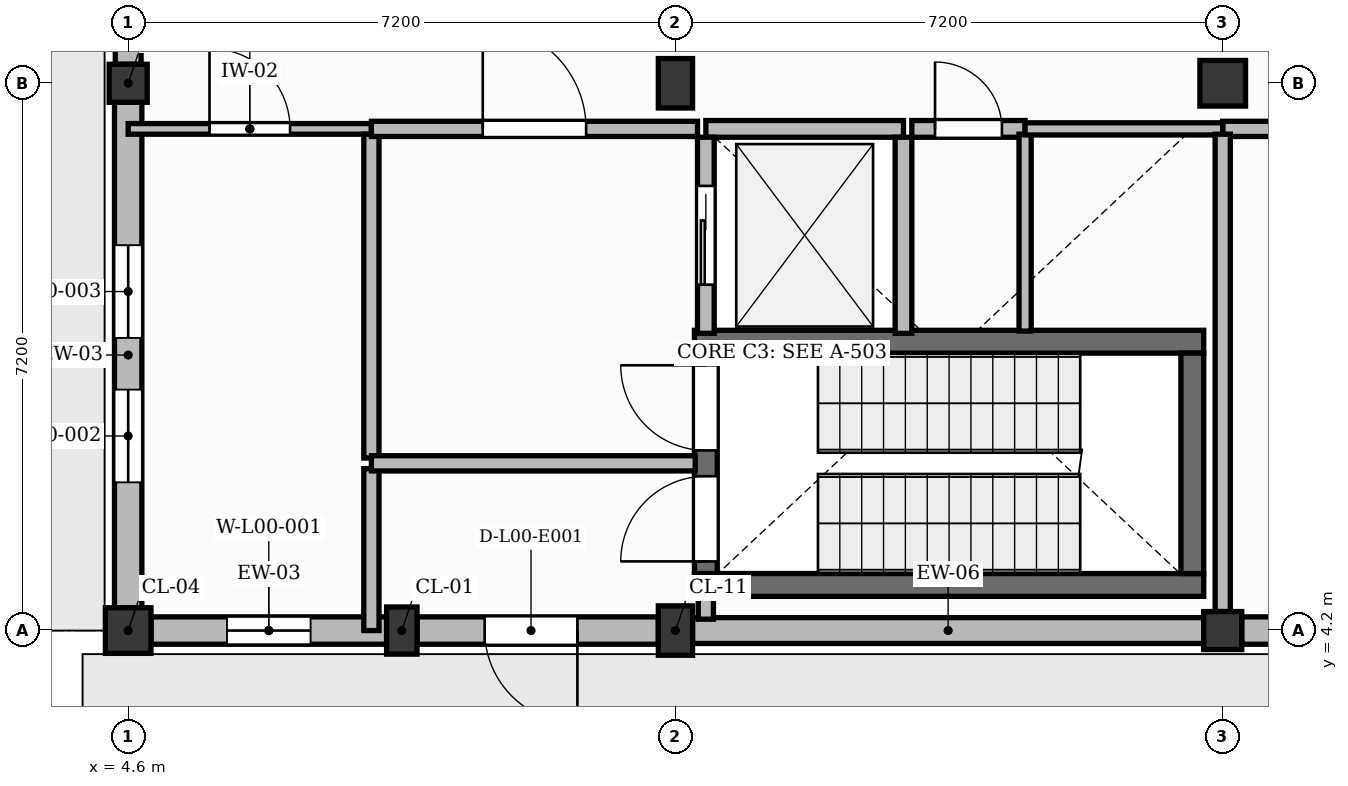
"""IFC4 building model, lengths in metres.
Left out: names, types, materials, properties, quantities, classifications, styles, units other than length and angle.
Written with IfcOpenShell. Run it as: python <this file> out.ifc"""

import sys

from ifc_helpers import new_model, si_unit, direction, frame, frame_2d, origin, origin_2d, place, context, subcontext, project, spatial, rectangle, extrude, element, fill, save


model = new_model("IFC4")
c1 = context("Model", 3, precision=1e-05, world=origin(), true_north=direction((0.0, 1.0)))
c2 = subcontext(c1, "Body", "Model", "MODEL_VIEW")
j1 = project(units=[si_unit("LENGTHUNIT", "METRE"), si_unit("PLANEANGLEUNIT", "RADIAN")], contexts=[c1])
p1 = place(None, origin())
s1 = spatial("IfcSite", under=j1, at=p1, CompositionType="ELEMENT")
p2 = place(p1, origin())
s2 = spatial("IfcBuilding", under=s1, at=p2, CompositionType="ELEMENT")
p3 = place(p2, origin())
s3 = spatial("IfcBuildingStorey", under=s2, at=p3, CompositionType="ELEMENT", Elevation=0.0)
p4 = place(p3, frame((4.6, 4.2, 0.0), z_axis=(0.0, 0.0, 1.0), x_axis=(1.0, 0.0, 0.0)))
e1 = element("IfcColumn", 1, at=p4, inside=s3, PredefinedType="COLUMN", context=c2, shape_type="SweptSolid", body=[
    extrude(rectangle(XDim=0.6, YDim=0.6, at=origin_2d()), origin(), (0.0, 0.0, 1.0), 4.2),
])
p5 = place(p3, frame((4.6, 11.4, 0.0), z_axis=(0.0, 0.0, 1.0), x_axis=(1.0, 0.0, 0.0)))
e2 = element("IfcColumn", 2, at=p5, inside=s3, PredefinedType="COLUMN", context=c2, shape_type="SweptSolid", body=[
    extrude(rectangle(XDim=0.5, YDim=0.5, at=origin_2d()), origin(), (0.0, 0.0, 1.0), 4.2),
])
for number, where, z_axis, x_axis in (
    (3, (11.8, 4.2, 0.0), (0.0, 0.0, 1.0), (1.0, 0.0, 0.0)),
    (4, (11.8, 11.4, 0.0), (0.0, 0.0, 1.0), (1.0, 0.0, 0.0)),
):
    element("IfcColumn", number, at=place(p3, frame(where, z_axis=z_axis, x_axis=x_axis)), inside=s3, PredefinedType="COLUMN", context=c2, shape_type="SweptSolid", body=[
        extrude(rectangle(XDim=0.45, YDim=0.65, at=origin_2d()), origin(), (0.0, 0.0, 1.0), 4.2),
    ])
p6 = place(p3, frame((19.0, 4.2, 0.0), z_axis=(0.0, 0.0, 1.0), x_axis=(1.0, 0.0, 0.0)))
e5 = element("IfcColumn", 5, at=p6, inside=s3, PredefinedType="COLUMN", context=c2, shape_type="SweptSolid", body=[
    extrude(rectangle(XDim=0.5, YDim=0.5, at=origin_2d()), origin(), (0.0, 0.0, 1.0), 4.2),
])
p7 = place(p3, frame((19.0, 11.4, 0.0), z_axis=(0.0, 0.0, 1.0), x_axis=(1.0, 0.0, 0.0)))
e6 = element("IfcColumn", 6, at=p7, inside=s3, PredefinedType="COLUMN", context=c2, shape_type="SweptSolid", body=[
    extrude(rectangle(XDim=0.6, YDim=0.6, at=origin_2d()), origin(), (0.0, 0.0, 1.0), 4.2),
])
p8 = place(p3, frame((8.2, 4.2, 0.0), z_axis=(0.0, 0.0, 1.0), x_axis=(1.0, 0.0, 0.0)))
e7 = element("IfcColumn", 7, at=p8, inside=s3, PredefinedType="PILASTER", context=c2, shape_type="SweptSolid", body=[
    extrude(rectangle(XDim=0.4, YDim=0.62, at=origin_2d()), origin(), (0.0, 0.0, 1.0), 4.2),
])
p9 = place(p3, frame((4.9, 4.2, 0.0), z_axis=(0.0, 0.0, 1.0), x_axis=(1.0, 0.0, 0.0)))
e8 = element("IfcWall", 8, at=p9, inside=s3, PredefinedType="SOLIDWALL", context=c2, shape_type="SweptSolid", body=[
    extrude(rectangle(XDim=3.1, YDim=0.36, at=frame_2d((1.55, 0.0))), origin(), (0.0, 0.0, 1.0), 3.68),
])
p10 = place(p9, frame((1.0, 0.0, 1.0)))
e9 = element("IfcOpeningElement", 9, at=p10, cuts=e8, PredefinedType="OPENING", context=c2, shape_type="SweptSolid", body=[
    extrude(rectangle(XDim=1.1, YDim=2.2, at=frame_2d((0.55, 1.1))), frame((0.0, 0.19, 0.0), z_axis=(0.0, -1.0, 0.0), x_axis=(1.0, 0.0, 0.0)), (0.0, 0.0, 1.0), 0.38),
])
p11 = place(p3, frame((8.4, 4.2, 0.0), z_axis=(0.0, 0.0, 1.0), x_axis=(1.0, 0.0, 0.0)))
e10 = element("IfcWall", 10, at=p11, inside=s3, PredefinedType="SOLIDWALL", context=c2, shape_type="SweptSolid", body=[
    extrude(rectangle(XDim=3.175, YDim=0.36, at=frame_2d((1.587, 0.0))), origin(), (0.0, 0.0, 1.0), 3.68),
])
p12 = place(p11, frame((0.89, 0.0, 0.0)))
e11 = element("IfcOpeningElement", 11, at=p12, cuts=e10, PredefinedType="OPENING", context=c2, shape_type="SweptSolid", body=[
    extrude(rectangle(XDim=1.22, YDim=2.2, at=frame_2d((0.61, 1.1))), frame((0.0, 0.19, 0.0), z_axis=(0.0, -1.0, 0.0), x_axis=(1.0, 0.0, 0.0)), (0.0, 0.0, 1.0), 0.38),
])
p13 = place(p3, frame((4.6, 4.5, 0.0), z_axis=(0.0, 0.0, 1.0), x_axis=(0.0, 1.0, 0.0)))
e12 = element("IfcWall", 12, at=p13, inside=s3, PredefinedType="SOLIDWALL", context=c2, shape_type="SweptSolid", body=[
    extrude(rectangle(XDim=6.65, YDim=0.36, at=frame_2d((3.325, 0.0))), origin(), (0.0, 0.0, 1.0), 3.68),
])
p14 = place(p13, frame((1.65, 0.0, 1.0)))
e13 = element("IfcOpeningElement", 13, at=p14, cuts=e12, PredefinedType="OPENING", context=c2, shape_type="SweptSolid", body=[
    extrude(rectangle(XDim=1.22, YDim=2.2, at=frame_2d((0.61, 1.1))), frame((0.0, 0.19, 0.0), z_axis=(0.0, -1.0, 0.0), x_axis=(1.0, 0.0, 0.0)), (0.0, 0.0, 1.0), 0.38),
])
p15 = place(p13, frame((3.55, 0.0, 1.0)))
e14 = element("IfcOpeningElement", 14, at=p15, cuts=e12, PredefinedType="OPENING", context=c2, shape_type="SweptSolid", body=[
    extrude(rectangle(XDim=1.22, YDim=2.2, at=frame_2d((0.61, 1.1))), frame((0.0, 0.19, 0.0), z_axis=(0.0, -1.0, 0.0), x_axis=(1.0, 0.0, 0.0)), (0.0, 0.0, 1.0), 0.38),
])
p16 = place(p3, frame((4.6, 11.65, 0.0), z_axis=(0.0, 0.0, 1.0), x_axis=(0.0, 1.0, 0.0)))
e15 = element("IfcWall", 15, at=p16, inside=s3, PredefinedType="SOLIDWALL", context=c2, shape_type="SweptSolid", body=[
    extrude(rectangle(XDim=6.7, YDim=0.34, at=frame_2d((3.35, 0.0))), origin(), (0.0, 0.0, 1.0), 3.68),
])
p17 = place(p16, frame((3.425, 0.0, 1.0)))
e16 = element("IfcOpeningElement", 16, at=p17, cuts=e15, PredefinedType="OPENING", context=c2, shape_type="SweptSolid", body=[
    extrude(rectangle(XDim=1.48, YDim=2.2, at=frame_2d((0.74, 1.1))), frame((0.0, 0.18, 0.0), z_axis=(0.0, -1.0, 0.0), x_axis=(1.0, 0.0, 0.0)), (0.0, 0.0, 1.0), 0.36),
])
p18 = place(p3, frame((12.025, 4.2, 0.0), z_axis=(0.0, 0.0, 1.0), x_axis=(1.0, 0.0, 0.0)))
e17 = element("IfcWall", 17, at=p18, inside=s3, PredefinedType="SOLIDWALL", context=c2, shape_type="SweptSolid", body=[
    extrude(rectangle(XDim=6.725, YDim=0.34, at=frame_2d((3.363, 0.0))), origin(), (0.0, 0.0, 1.0), 3.68),
])
p19 = place(p3, frame((19.25, 4.2, 0.0), z_axis=(0.0, 0.0, 1.0), x_axis=(1.0, 0.0, 0.0)))
e18 = element("IfcWall", 18, at=p19, inside=s3, PredefinedType="SOLIDWALL", context=c2, shape_type="SweptSolid", body=[
    extrude(rectangle(XDim=3.15, YDim=0.36, at=frame_2d((1.575, 0.0))), origin(), (0.0, 0.0, 1.0), 3.68),
])
p20 = place(p19, frame((0.955, 0.0, 1.0)))
e19 = element("IfcOpeningElement", 19, at=p20, cuts=e18, PredefinedType="OPENING", context=c2, shape_type="SweptSolid", body=[
    extrude(rectangle(XDim=1.24, YDim=1.8, at=frame_2d((0.62, 0.9))), frame((0.0, 0.19, 0.0), z_axis=(0.0, -1.0, 0.0), x_axis=(1.0, 0.0, 0.0)), (0.0, 0.0, 1.0), 0.38),
])
for number, where, z_axis, x_axis in (
    (20, (12.05, 4.8, 0.0), (0.0, 0.0, 1.0), (1.0, 0.0, 0.0)),
    (21, (12.05, 8.0, 0.0), (0.0, 0.0, 1.0), (1.0, 0.0, 0.0)),
):
    element("IfcWall", number, at=place(p3, frame(where, z_axis=z_axis, x_axis=x_axis)), inside=s3, PredefinedType="SHEAR", context=c2, shape_type="SweptSolid", body=[
        extrude(rectangle(XDim=6.7, YDim=0.3, at=frame_2d((3.35, 0.0))), origin(), (0.0, 0.0, 1.0), 4.25),
    ])
p21 = place(p3, frame((12.2, 4.95, 0.0), z_axis=(0.0, 0.0, 1.0), x_axis=(0.0, 1.0, 0.0)))
e22 = element("IfcWall", 22, at=p21, inside=s3, PredefinedType="SHEAR", context=c2, shape_type="SweptSolid", body=[
    extrude(rectangle(XDim=2.9, YDim=0.3, at=frame_2d((1.45, 0.0))), origin(), (0.0, 0.0, 1.0), 4.25),
])
p22 = place(p21, frame((0.16, 0.0, 0.0)))
e23 = element("IfcOpeningElement", 23, at=p22, cuts=e22, PredefinedType="OPENING", context=c2, shape_type="SweptSolid", body=[
    extrude(rectangle(XDim=1.12, YDim=2.1, at=frame_2d((0.56, 1.05))), frame((0.0, 0.16, 0.0), z_axis=(0.0, -1.0, 0.0), x_axis=(1.0, 0.0, 0.0)), (0.0, 0.0, 1.0), 0.32),
])
p23 = place(p21, frame((1.62, 0.0, 0.0)))
e24 = element("IfcOpeningElement", 24, at=p23, cuts=e22, PredefinedType="OPENING", context=c2, shape_type="SweptSolid", body=[
    extrude(rectangle(XDim=1.12, YDim=2.1, at=frame_2d((0.56, 1.05))), frame((0.0, 0.16, 0.0), z_axis=(0.0, -1.0, 0.0), x_axis=(1.0, 0.0, 0.0)), (0.0, 0.0, 1.0), 0.32),
])
p24 = place(p3, frame((18.6, 4.95, 0.0), z_axis=(0.0, 0.0, 1.0), x_axis=(0.0, 1.0, 0.0)))
e25 = element("IfcWall", 25, at=p24, inside=s3, PredefinedType="SHEAR", context=c2, shape_type="SweptSolid", body=[
    extrude(rectangle(XDim=2.9, YDim=0.3, at=frame_2d((1.45, 0.0))), origin(), (0.0, 0.0, 1.0), 4.25),
])
p25 = place(p3, frame((12.2, 10.8, 0.0), z_axis=(0.0, 0.0, 1.0), x_axis=(1.0, 0.0, 0.0)))
e26 = element("IfcWall", 26, at=p25, inside=s3, PredefinedType="SOLIDWALL", context=c2, shape_type="SweptSolid", body=[
    extrude(rectangle(XDim=2.6, YDim=0.22, at=frame_2d((1.3, 0.0))), origin(), (0.0, 0.0, 1.0), 4.25),
])
p26 = place(p3, frame((12.2, 8.11, 0.0), z_axis=(0.0, 0.0, 1.0), x_axis=(0.0, 1.0, 0.0)))
e27 = element("IfcWall", 27, at=p26, inside=s3, PredefinedType="SOLIDWALL", context=c2, shape_type="SweptSolid", body=[
    extrude(rectangle(XDim=2.58, YDim=0.22, at=frame_2d((1.29, 0.0))), origin(), (0.0, 0.0, 1.0), 4.25),
])
p27 = place(p26, frame((0.64, 0.0, 0.0)))
e28 = element("IfcOpeningElement", 28, at=p27, cuts=e27, PredefinedType="OPENING", context=c2, shape_type="SweptSolid", body=[
    extrude(rectangle(XDim=1.3, YDim=2.2, at=frame_2d((0.65, 1.1))), frame((0.0, 0.12, 0.0), z_axis=(0.0, -1.0, 0.0), x_axis=(1.0, 0.0, 0.0)), (0.0, 0.0, 1.0), 0.24),
])
p28 = place(p3, frame((14.8, 8.11, 0.0), z_axis=(0.0, 0.0, 1.0), x_axis=(0.0, 1.0, 0.0)))
e29 = element("IfcWall", 29, at=p28, inside=s3, PredefinedType="SOLIDWALL", context=c2, shape_type="SweptSolid", body=[
    extrude(rectangle(XDim=2.58, YDim=0.22, at=frame_2d((1.29, 0.0))), origin(), (0.0, 0.0, 1.0), 4.25),
])
p29 = place(p3, frame((4.6, 10.8, 0.0), z_axis=(0.0, 0.0, 1.0), x_axis=(1.0, 0.0, 0.0)))
e30 = element("IfcWall", 30, at=p29, inside=s3, PredefinedType="PARTITIONING", context=c2, shape_type="SweptSolid", body=[
    extrude(rectangle(XDim=3.2, YDim=0.14, at=frame_2d((1.6, 0.0))), origin(), (0.0, 0.0, 1.0), 4.18),
])
p30 = place(p29, frame((1.07, 0.0, 0.0)))
e31 = element("IfcOpeningElement", 31, at=p30, cuts=e30, PredefinedType="OPENING", context=c2, shape_type="SweptSolid", body=[
    extrude(rectangle(XDim=1.06, YDim=2.15, at=frame_2d((0.53, 1.075))), frame((0.0, 0.08, 0.0), z_axis=(0.0, -1.0, 0.0), x_axis=(1.0, 0.0, 0.0)), (0.0, 0.0, 1.0), 0.16),
])
p31 = place(p3, frame((7.8, 4.2, 0.0), z_axis=(0.0, 0.0, 1.0), x_axis=(0.0, 1.0, 0.0)))
e32 = element("IfcWall", 32, at=p31, inside=s3, PredefinedType="PARTITIONING", context=c2, shape_type="SweptSolid", body=[
    extrude(rectangle(XDim=2.13, YDim=0.2, at=frame_2d((1.065, 0.0))), origin(), (0.0, 0.0, 1.0), 4.18),
])
for number, where, z_axis, x_axis in (
    (33, (7.8, 6.47, 0.0), (0.0, 0.0, 1.0), (0.0, 1.0, 0.0)),
    (34, (7.8, 6.4, 0.0), (0.0, 0.0, 1.0), (1.0, 0.0, 0.0)),
):
    element("IfcWall", number, at=place(p3, frame(where, z_axis=z_axis, x_axis=x_axis)), inside=s3, PredefinedType="PARTITIONING", context=c2, shape_type="SweptSolid", body=[
        extrude(rectangle(XDim=4.26, YDim=0.2, at=frame_2d((2.13, 0.0))), origin(), (0.0, 0.0, 1.0), 4.18),
    ])
p32 = place(p3, frame((7.8, 10.8, 0.0), z_axis=(0.0, 0.0, 1.0), x_axis=(1.0, 0.0, 0.0)))
e35 = element("IfcWall", 35, at=p32, inside=s3, PredefinedType="PARTITIONING", context=c2, shape_type="SweptSolid", body=[
    extrude(rectangle(XDim=4.29, YDim=0.2, at=frame_2d((2.145, 0.0))), origin(), (0.0, 0.0, 1.0), 4.18),
])
p33 = place(p32, frame((1.465, 0.0, 0.0)))
e36 = element("IfcOpeningElement", 36, at=p33, cuts=e35, PredefinedType="OPENING", context=c2, shape_type="SweptSolid", body=[
    extrude(rectangle(XDim=1.36, YDim=2.2, at=frame_2d((0.68, 1.1))), frame((0.0, 0.11, 0.0), z_axis=(0.0, -1.0, 0.0), x_axis=(1.0, 0.0, 0.0)), (0.0, 0.0, 1.0), 0.22),
])
p34 = place(p3, frame((14.91, 10.8, 0.0), z_axis=(0.0, 0.0, 1.0), x_axis=(1.0, 0.0, 0.0)))
e37 = element("IfcWall", 37, at=p34, inside=s3, PredefinedType="SOLIDWALL", context=c2, shape_type="SweptSolid", body=[
    extrude(rectangle(XDim=1.49, YDim=0.22, at=frame_2d((0.745, 0.0))), origin(), (0.0, 0.0, 1.0), 4.18),
])
p35 = place(p34, frame((0.305, 0.0, 0.0)))
e38 = element("IfcOpeningElement", 38, at=p35, cuts=e37, PredefinedType="OPENING", context=c2, shape_type="SweptSolid", body=[
    extrude(rectangle(XDim=0.88, YDim=2.05, at=frame_2d((0.44, 1.025))), frame((0.0, 0.12, 0.0), z_axis=(0.0, -1.0, 0.0), x_axis=(1.0, 0.0, 0.0)), (0.0, 0.0, 1.0), 0.24),
])
p36 = place(p3, frame((19.0, 10.8, 0.0), z_axis=(0.0, 0.0, 1.0), x_axis=(1.0, 0.0, 0.0)))
e39 = element("IfcWall", 39, at=p36, inside=s3, PredefinedType="PARTITIONING", context=c2, shape_type="SweptSolid", body=[
    extrude(rectangle(XDim=7.2, YDim=0.2, at=frame_2d((3.6, 0.0))), origin(), (0.0, 0.0, 1.0), 4.18),
])
p37 = place(p36, frame((3.12, 0.0, 0.0)))
e40 = element("IfcOpeningElement", 40, at=p37, cuts=e39, PredefinedType="OPENING", context=c2, shape_type="SweptSolid", body=[
    extrude(rectangle(XDim=0.96, YDim=2.1, at=frame_2d((0.48, 1.05))), frame((0.0, 0.11, 0.0), z_axis=(0.0, -1.0, 0.0), x_axis=(1.0, 0.0, 0.0)), (0.0, 0.0, 1.0), 0.22),
])
p38 = place(p3, frame((16.4, 8.14, 0.0), z_axis=(0.0, 0.0, 1.0), x_axis=(0.0, 1.0, 0.0)))
e41 = element("IfcWall", 41, at=p38, inside=s3, PredefinedType="PARTITIONING", context=c2, shape_type="SweptSolid", body=[
    extrude(rectangle(XDim=2.59, YDim=0.16, at=frame_2d((1.295, 0.0))), origin(), (0.0, 0.0, 1.0), 4.18),
])
p39 = place(p3, frame((12.2, 4.35, 0.0), z_axis=(0.0, 0.0, 1.0), x_axis=(0.0, 1.0, 0.0)))
e42 = element("IfcWall", 42, at=p39, inside=s3, PredefinedType="PARTITIONING", context=c2, shape_type="SweptSolid", body=[
    extrude(rectangle(XDim=0.31, YDim=0.2, at=frame_2d((0.155, 0.0))), origin(), (0.0, 0.0, 1.0), 4.18),
])
p40 = place(p3, frame((16.4, 10.8, 0.0), z_axis=(0.0, 0.0, 1.0), x_axis=(1.0, 0.0, 0.0)))
e43 = element("IfcWall", 43, at=p40, inside=s3, PredefinedType="PARTITIONING", context=c2, shape_type="SweptSolid", body=[
    extrude(rectangle(XDim=2.6, YDim=0.16, at=frame_2d((1.3, 0.0))), origin(), (0.0, 0.0, 1.0), 4.18),
])
p41 = place(p3, frame((19.0, 4.45, 0.0), z_axis=(0.0, 0.0, 1.0), x_axis=(0.0, 1.0, 0.0)))
e44 = element("IfcWall", 44, at=p41, inside=s3, PredefinedType="PARTITIONING", context=c2, shape_type="SweptSolid", body=[
    extrude(rectangle(XDim=6.28, YDim=0.2, at=frame_2d((3.14, 0.0))), origin(), (0.0, 0.0, 1.0), 3.5),
])
p42 = place(p10, origin())
e45 = element("IfcWindow", 45, at=p42, inside=s3, PartitioningType="SINGLE_PANEL", PredefinedType="WINDOW", context=c2, shape_type="SweptSolid", body=[
    extrude(rectangle(XDim=1.1, YDim=2.2, at=frame_2d((0.55, 1.1))), frame((0.0, 0.03, 0.0), z_axis=(0.0, -1.0, 0.0), x_axis=(1.0, 0.0, 0.0)), (0.0, 0.0, 1.0), 0.06),
])
fill(e9, e45)
p43 = place(p12, frame((1.22, 0.0, 0.0), z_axis=(0.0, 0.0, 1.0), x_axis=(-1.0, 0.0, 0.0)))
e46 = element("IfcDoor", 46, at=p43, inside=s3, OperationType="SINGLE_SWING_LEFT", PredefinedType="DOOR", context=c2, shape_type="SweptSolid", body=[
    extrude(rectangle(XDim=1.22, YDim=2.2, at=frame_2d((0.61, 1.1))), frame((0.0, 0.025, 0.0), z_axis=(0.0, -1.0, 0.0), x_axis=(1.0, 0.0, 0.0)), (0.0, 0.0, 1.0), 0.05),
])
fill(e11, e46)
p44 = place(p14, origin())
e47 = element("IfcWindow", 47, at=p44, inside=s3, PartitioningType="SINGLE_PANEL", PredefinedType="WINDOW", context=c2, shape_type="SweptSolid", body=[
    extrude(rectangle(XDim=1.22, YDim=2.2, at=frame_2d((0.61, 1.1))), frame((0.0, 0.03, 0.0), z_axis=(0.0, -1.0, 0.0), x_axis=(1.0, 0.0, 0.0)), (0.0, 0.0, 1.0), 0.06),
])
fill(e13, e47)
p45 = place(p15, origin())
e48 = element("IfcWindow", 48, at=p45, inside=s3, PartitioningType="SINGLE_PANEL", PredefinedType="WINDOW", context=c2, shape_type="SweptSolid", body=[
    extrude(rectangle(XDim=1.22, YDim=2.2, at=frame_2d((0.61, 1.1))), frame((0.0, 0.03, 0.0), z_axis=(0.0, -1.0, 0.0), x_axis=(1.0, 0.0, 0.0)), (0.0, 0.0, 1.0), 0.06),
])
fill(e14, e48)
p46 = place(p27, origin())
e49 = element("IfcDoor", 49, at=p46, inside=s3, OperationType="SLIDING_TO_LEFT", PredefinedType="DOOR", context=c2, shape_type="SweptSolid", body=[
    extrude(rectangle(XDim=1.3, YDim=2.2, at=frame_2d((0.65, 1.1))), frame((0.0, 0.025, 0.0), z_axis=(0.0, -1.0, 0.0), x_axis=(1.0, 0.0, 0.0)), (0.0, 0.0, 1.0), 0.05),
])
fill(e28, e49)
p47 = place(p22, origin())
e50 = element("IfcDoor", 50, at=p47, inside=s3, OperationType="SINGLE_SWING_LEFT", PredefinedType="DOOR", context=c2, shape_type="SweptSolid", body=[
    extrude(rectangle(XDim=1.12, YDim=2.1, at=frame_2d((0.56, 1.05))), frame((0.0, 0.025, 0.0), z_axis=(0.0, -1.0, 0.0), x_axis=(1.0, 0.0, 0.0)), (0.0, 0.0, 1.0), 0.05),
])
fill(e23, e50)
p48 = place(p23, origin())
e51 = element("IfcDoor", 51, at=p48, inside=s3, OperationType="SINGLE_SWING_RIGHT", PredefinedType="DOOR", context=c2, shape_type="SweptSolid", body=[
    extrude(rectangle(XDim=1.12, YDim=2.1, at=frame_2d((0.56, 1.05))), frame((0.0, 0.025, 0.0), z_axis=(0.0, -1.0, 0.0), x_axis=(1.0, 0.0, 0.0)), (0.0, 0.0, 1.0), 0.05),
])
fill(e24, e51)
p49 = place(p33, origin())
e52 = element("IfcDoor", 52, at=p49, inside=s3, OperationType="SINGLE_SWING_LEFT", PredefinedType="DOOR", context=c2, shape_type="SweptSolid", body=[
    extrude(rectangle(XDim=1.36, YDim=2.2, at=frame_2d((0.68, 1.1))), frame((0.0, 0.025, 0.0), z_axis=(0.0, -1.0, 0.0), x_axis=(1.0, 0.0, 0.0)), (0.0, 0.0, 1.0), 0.05),
])
fill(e36, e52)
p50 = place(p35, origin())
e53 = element("IfcDoor", 53, at=p50, inside=s3, OperationType="SINGLE_SWING_LEFT", PredefinedType="DOOR", context=c2, shape_type="SweptSolid", body=[
    extrude(rectangle(XDim=0.88, YDim=2.05, at=frame_2d((0.44, 1.025))), frame((0.0, 0.025, 0.0), z_axis=(0.0, -1.0, 0.0), x_axis=(1.0, 0.0, 0.0)), (0.0, 0.0, 1.0), 0.05),
])
fill(e38, e53)
p51 = place(p30, origin())
e54 = element("IfcDoor", 54, at=p51, inside=s3, OperationType="SINGLE_SWING_LEFT", PredefinedType="DOOR", context=c2, shape_type="SweptSolid", body=[
    extrude(rectangle(XDim=1.06, YDim=2.15, at=frame_2d((0.53, 1.075))), frame((0.0, 0.025, 0.0), z_axis=(0.0, -1.0, 0.0), x_axis=(1.0, 0.0, 0.0)), (0.0, 0.0, 1.0), 0.05),
])
fill(e31, e54)
save(model, sys.argv[1])
